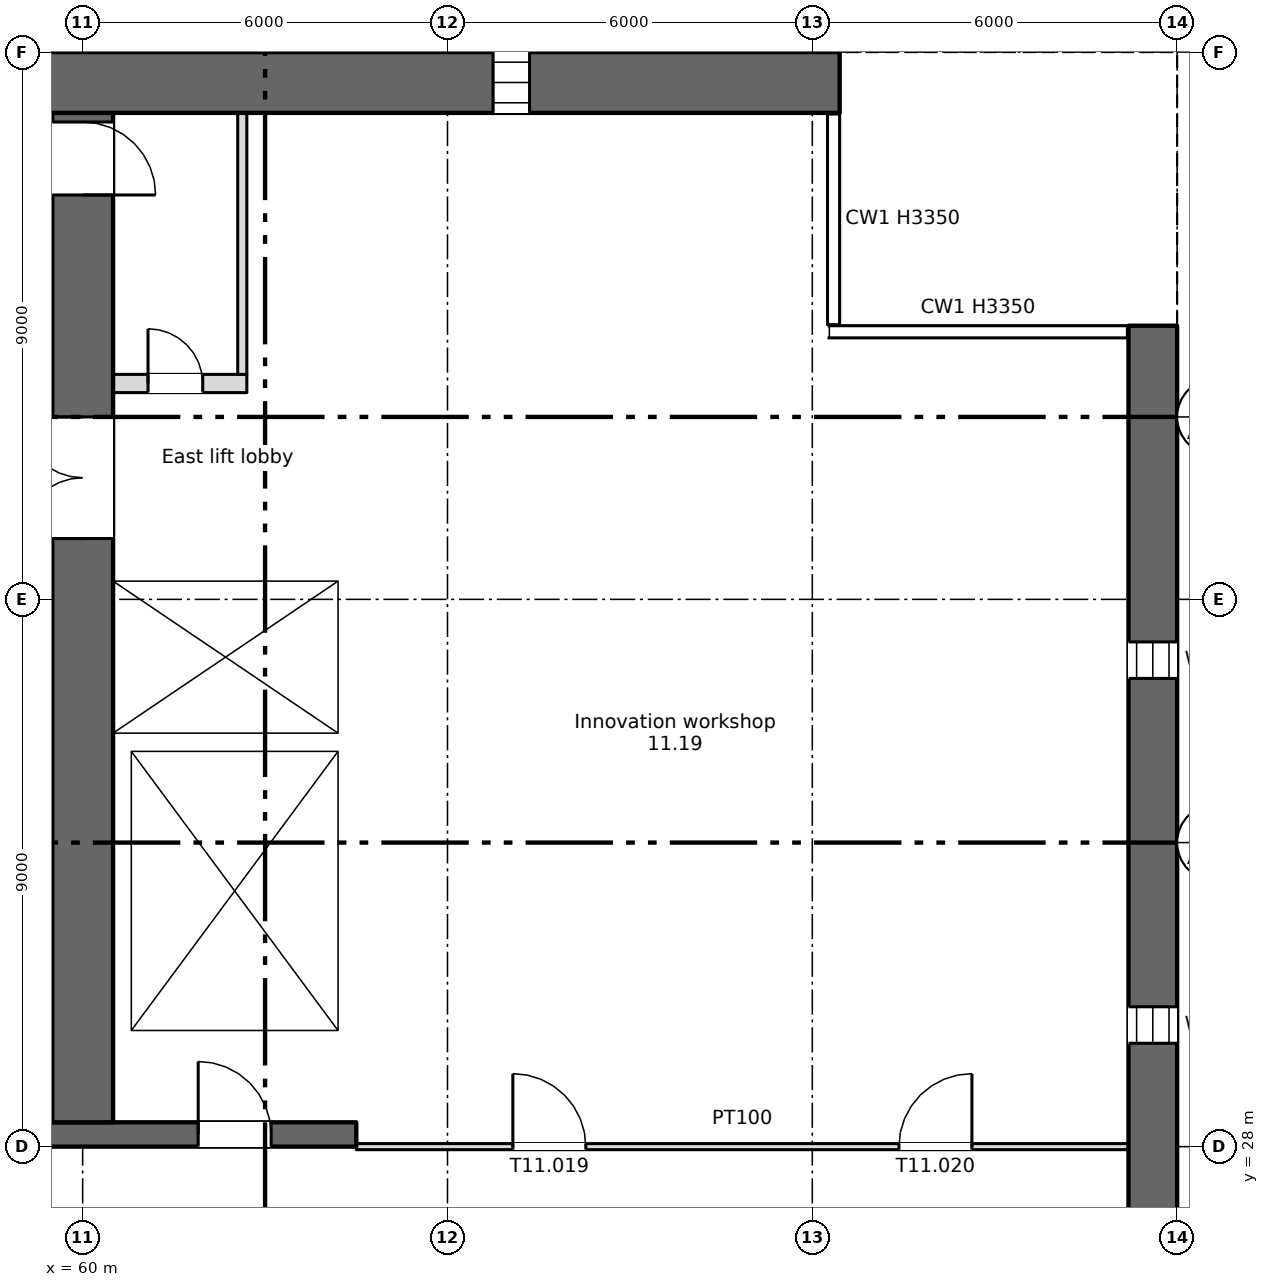
"""IFC4 building model, lengths in metres.
Left out: names, types, materials, properties, quantities, classifications, styles, units other than length and angle.
Written with IfcOpenShell. Run it as: python <this file> out.ifc"""

import sys

from ifc_helpers import new_model, si_unit, direction, frame, frame_2d, origin, place, context, subcontext, project, spatial, rectangle, extrude, element, fill, save


model = new_model("IFC4")
c1 = context("Model", 3, precision=1e-05, world=origin(), true_north=direction((0.0, 1.0)))
c2 = subcontext(c1, "Body", "Model", "MODEL_VIEW")
j1 = project(units=[si_unit("LENGTHUNIT", "METRE"), si_unit("PLANEANGLEUNIT", "RADIAN")], contexts=[c1])
p1 = place(None, origin())
s1 = spatial("IfcSite", under=j1, at=p1, CompositionType="ELEMENT")
p2 = place(p1, origin())
s2 = spatial("IfcBuilding", under=s1, at=p2, CompositionType="ELEMENT")
p3 = place(p2, frame((0.0, 0.0, 52.5)))
s3 = spatial("IfcBuildingStorey", under=s2, at=p3, CompositionType="ELEMENT", Elevation=52.5)
p4 = place(p3, frame((77.6, 4.5, 0.0), z_axis=(0.0, 0.0, 1.0), x_axis=(0.0, 1.0, 0.0)))
e1 = element("IfcWall", 1, at=p4, inside=s3, PredefinedType="SHEAR", context=c2, shape_type="SweptSolid", body=[
    extrude(rectangle(XDim=37.0, YDim=0.8, at=frame_2d((18.5, 0.0))), origin(), (0.0, 0.0, 1.0), 3.35),
])
p5 = place(p4, frame((1.2, 0.0, 0.6)))
e2 = element("IfcOpeningElement", 2, at=p5, cuts=e1, PredefinedType="OPENING", context=c2, shape_type="SweptSolid", body=[
    extrude(rectangle(XDim=0.6, YDim=2.4, at=frame_2d((0.3, 1.2))), frame((0.0, 0.41, 0.0), z_axis=(0.0, -1.0, 0.0), x_axis=(1.0, 0.0, 0.0)), (0.0, 0.0, 1.0), 0.82),
])
p6 = place(p4, frame((7.2, 0.0, 0.6)))
e3 = element("IfcOpeningElement", 3, at=p6, cuts=e1, PredefinedType="OPENING", context=c2, shape_type="SweptSolid", body=[
    extrude(rectangle(XDim=0.6, YDim=2.4, at=frame_2d((0.3, 1.2))), frame((0.0, 0.41, 0.0), z_axis=(0.0, -1.0, 0.0), x_axis=(1.0, 0.0, 0.0)), (0.0, 0.0, 1.0), 0.82),
])
p7 = place(p4, frame((13.2, 0.0, 0.6)))
e4 = element("IfcOpeningElement", 4, at=p7, cuts=e1, PredefinedType="OPENING", context=c2, shape_type="SweptSolid", body=[
    extrude(rectangle(XDim=0.6, YDim=2.4, at=frame_2d((0.3, 1.2))), frame((0.0, 0.41, 0.0), z_axis=(0.0, -1.0, 0.0), x_axis=(1.0, 0.0, 0.0)), (0.0, 0.0, 1.0), 0.82),
])
p8 = place(p4, frame((19.2, 0.0, 0.6)))
e5 = element("IfcOpeningElement", 5, at=p8, cuts=e1, PredefinedType="OPENING", context=c2, shape_type="SweptSolid", body=[
    extrude(rectangle(XDim=0.6, YDim=2.4, at=frame_2d((0.3, 1.2))), frame((0.0, 0.41, 0.0), z_axis=(0.0, -1.0, 0.0), x_axis=(1.0, 0.0, 0.0)), (0.0, 0.0, 1.0), 0.82),
])
p9 = place(p4, frame((25.2, 0.0, 0.6)))
e6 = element("IfcOpeningElement", 6, at=p9, cuts=e1, PredefinedType="OPENING", context=c2, shape_type="SweptSolid", body=[
    extrude(rectangle(XDim=0.6, YDim=2.4, at=frame_2d((0.3, 1.2))), frame((0.0, 0.41, 0.0), z_axis=(0.0, -1.0, 0.0), x_axis=(1.0, 0.0, 0.0)), (0.0, 0.0, 1.0), 0.82),
])
p10 = place(p4, frame((31.2, 0.0, 0.6)))
e7 = element("IfcOpeningElement", 7, at=p10, cuts=e1, PredefinedType="OPENING", context=c2, shape_type="SweptSolid", body=[
    extrude(rectangle(XDim=0.6, YDim=2.4, at=frame_2d((0.3, 1.2))), frame((0.0, 0.41, 0.0), z_axis=(0.0, -1.0, 0.0), x_axis=(1.0, 0.0, 0.0)), (0.0, 0.0, 1.0), 0.82),
])
p11 = place(p3, frame((5.55, 45.5, 0.0), z_axis=(0.0, 0.0, 1.0), x_axis=(1.0, 0.0, 0.0)))
e8 = element("IfcWall", 8, at=p11, inside=s3, PredefinedType="SHEAR", context=c2, shape_type="SweptSolid", body=[
    extrude(rectangle(XDim=66.9, YDim=1.0, at=frame_2d((33.45, 0.0))), origin(), (0.0, 0.0, 1.0), 3.35),
])
p12 = place(p11, frame((1.2, 0.0, 0.6)))
e9 = element("IfcOpeningElement", 9, at=p12, cuts=e8, PredefinedType="OPENING", context=c2, shape_type="SweptSolid", body=[
    extrude(rectangle(XDim=0.6, YDim=2.4, at=frame_2d((0.3, 1.2))), frame((0.0, 0.51, 0.0), z_axis=(0.0, -1.0, 0.0), x_axis=(1.0, 0.0, 0.0)), (0.0, 0.0, 1.0), 1.02),
])
p13 = place(p11, frame((7.2, 0.0, 0.6)))
e10 = element("IfcOpeningElement", 10, at=p13, cuts=e8, PredefinedType="OPENING", context=c2, shape_type="SweptSolid", body=[
    extrude(rectangle(XDim=0.6, YDim=2.4, at=frame_2d((0.3, 1.2))), frame((0.0, 0.51, 0.0), z_axis=(0.0, -1.0, 0.0), x_axis=(1.0, 0.0, 0.0)), (0.0, 0.0, 1.0), 1.02),
])
p14 = place(p11, frame((61.2, 0.0, 0.6)))
e11 = element("IfcOpeningElement", 11, at=p14, cuts=e8, PredefinedType="OPENING", context=c2, shape_type="SweptSolid", body=[
    extrude(rectangle(XDim=0.6, YDim=2.4, at=frame_2d((0.3, 1.2))), frame((0.0, 0.51, 0.0), z_axis=(0.0, -1.0, 0.0), x_axis=(1.0, 0.0, 0.0)), (0.0, 0.0, 1.0), 1.02),
])
p15 = place(p3, frame((6.7, 28.2, 0.0), z_axis=(0.0, 0.0, 1.0), x_axis=(1.0, 0.0, 0.0)))
e12 = element("IfcWall", 12, at=p15, inside=s3, PredefinedType="SHEAR", context=c2, shape_type="SweptSolid", body=[
    extrude(rectangle(XDim=57.8, YDim=0.4, at=frame_2d((28.9, 0.0))), origin(), (0.0, 0.0, 1.0), 3.35),
])
p16 = place(p15, frame((13.85, 0.0, 0.0)))
e13 = element("IfcOpeningElement", 13, at=p16, cuts=e12, PredefinedType="OPENING", context=c2, shape_type="SweptSolid", body=[
    extrude(rectangle(XDim=0.9, YDim=2.1, at=frame_2d((0.45, 1.05))), frame((0.0, 0.21, 0.0), z_axis=(0.0, -1.0, 0.0), x_axis=(1.0, 0.0, 0.0)), (0.0, 0.0, 1.0), 0.42),
])
p17 = place(p15, frame((48.562, 0.0, 0.0)))
e14 = element("IfcOpeningElement", 14, at=p17, cuts=e12, PredefinedType="OPENING", context=c2, shape_type="SweptSolid", body=[
    extrude(rectangle(XDim=0.9, YDim=2.1, at=frame_2d((0.45, 1.05))), frame((0.0, 0.21, 0.0), z_axis=(0.0, -1.0, 0.0), x_axis=(1.0, 0.0, 0.0)), (0.0, 0.0, 1.0), 0.42),
])
p18 = place(p15, frame((51.137, 0.0, 0.0)))
e15 = element("IfcOpeningElement", 15, at=p18, cuts=e12, PredefinedType="OPENING", context=c2, shape_type="SweptSolid", body=[
    extrude(rectangle(XDim=0.9, YDim=2.1, at=frame_2d((0.45, 1.05))), frame((0.0, 0.21, 0.0), z_axis=(0.0, -1.0, 0.0), x_axis=(1.0, 0.0, 0.0)), (0.0, 0.0, 1.0), 0.42),
])
p19 = place(p15, frame((1.35, 0.0, 0.0)))
e16 = element("IfcOpeningElement", 16, at=p19, cuts=e12, PredefinedType="OPENING", context=c2, shape_type="SweptSolid", body=[
    extrude(rectangle(XDim=0.9, YDim=2.1, at=frame_2d((0.45, 1.05))), frame((0.0, 0.21, 0.0), z_axis=(0.0, -1.0, 0.0), x_axis=(1.0, 0.0, 0.0)), (0.0, 0.0, 1.0), 0.42),
])
p20 = place(p15, frame((4.7, 0.0, 0.0)))
e17 = element("IfcOpeningElement", 17, at=p20, cuts=e12, PredefinedType="OPENING", context=c2, shape_type="SweptSolid", body=[
    extrude(rectangle(XDim=1.2, YDim=2.1, at=frame_2d((0.6, 1.05))), frame((0.0, 0.21, 0.0), z_axis=(0.0, -1.0, 0.0), x_axis=(1.0, 0.0, 0.0)), (0.0, 0.0, 1.0), 0.42),
])
p21 = place(p15, frame((31.7, 0.0, 0.0)))
e18 = element("IfcOpeningElement", 18, at=p21, cuts=e12, PredefinedType="OPENING", context=c2, shape_type="SweptSolid", body=[
    extrude(rectangle(XDim=1.2, YDim=2.1, at=frame_2d((0.6, 1.05))), frame((0.0, 0.21, 0.0), z_axis=(0.0, -1.0, 0.0), x_axis=(1.0, 0.0, 0.0)), (0.0, 0.0, 1.0), 0.42),
])
p22 = place(p15, frame((55.2, 0.0, 0.0)))
e19 = element("IfcOpeningElement", 19, at=p22, cuts=e12, PredefinedType="OPENING", context=c2, shape_type="SweptSolid", body=[
    extrude(rectangle(XDim=1.2, YDim=2.1, at=frame_2d((0.6, 1.05))), frame((0.0, 0.21, 0.0), z_axis=(0.0, -1.0, 0.0), x_axis=(1.0, 0.0, 0.0)), (0.0, 0.0, 1.0), 0.42),
])
p23 = place(p15, frame((21.7, 0.0, 0.0)))
e20 = element("IfcOpeningElement", 20, at=p23, cuts=e12, PredefinedType="OPENING", context=c2, shape_type="SweptSolid", body=[
    extrude(rectangle(XDim=1.2, YDim=2.1, at=frame_2d((0.6, 1.05))), frame((0.0, 0.21, 0.0), z_axis=(0.0, -1.0, 0.0), x_axis=(1.0, 0.0, 0.0)), (0.0, 0.0, 1.0), 0.42),
])
p24 = place(p15, frame((41.7, 0.0, 0.0)))
e21 = element("IfcOpeningElement", 21, at=p24, cuts=e12, PredefinedType="OPENING", context=c2, shape_type="SweptSolid", body=[
    extrude(rectangle(XDim=1.2, YDim=2.1, at=frame_2d((0.6, 1.05))), frame((0.0, 0.21, 0.0), z_axis=(0.0, -1.0, 0.0), x_axis=(1.0, 0.0, 0.0)), (0.0, 0.0, 1.0), 0.42),
])
p25 = place(p15, frame((24.85, 0.0, 0.0)))
e22 = element("IfcOpeningElement", 22, at=p25, cuts=e12, PredefinedType="OPENING", context=c2, shape_type="SweptSolid", body=[
    extrude(rectangle(XDim=2.4, YDim=2.1, at=frame_2d((1.2, 1.05))), frame((0.0, 0.21, 0.0), z_axis=(0.0, -1.0, 0.0), x_axis=(1.0, 0.0, 0.0)), (0.0, 0.0, 1.0), 0.42),
])
p26 = place(p15, frame((37.35, 0.0, 0.0)))
e23 = element("IfcOpeningElement", 23, at=p26, cuts=e12, PredefinedType="OPENING", context=c2, shape_type="SweptSolid", body=[
    extrude(rectangle(XDim=2.4, YDim=2.1, at=frame_2d((1.2, 1.05))), frame((0.0, 0.21, 0.0), z_axis=(0.0, -1.0, 0.0), x_axis=(1.0, 0.0, 0.0)), (0.0, 0.0, 1.0), 0.42),
])
p27 = place(p15, frame((7.85, 0.0, 0.0)))
e24 = element("IfcOpeningElement", 24, at=p27, cuts=e12, PredefinedType="OPENING", context=c2, shape_type="SweptSolid", body=[
    extrude(rectangle(XDim=2.4, YDim=2.1, at=frame_2d((1.2, 1.05))), frame((0.0, 0.21, 0.0), z_axis=(0.0, -1.0, 0.0), x_axis=(1.0, 0.0, 0.0)), (0.0, 0.0, 1.0), 0.42),
])
p28 = place(p15, frame((28.85, 0.0, 0.0)))
e25 = element("IfcOpeningElement", 25, at=p28, cuts=e12, PredefinedType="OPENING", context=c2, shape_type="SweptSolid", body=[
    extrude(rectangle(XDim=0.9, YDim=2.1, at=frame_2d((0.45, 1.05))), frame((0.0, 0.21, 0.0), z_axis=(0.0, -1.0, 0.0), x_axis=(1.0, 0.0, 0.0)), (0.0, 0.0, 1.0), 0.42),
])
p29 = place(p15, frame((34.85, 0.0, 0.0)))
e26 = element("IfcOpeningElement", 26, at=p29, cuts=e12, PredefinedType="OPENING", context=c2, shape_type="SweptSolid", body=[
    extrude(rectangle(XDim=0.9, YDim=2.1, at=frame_2d((0.45, 1.05))), frame((0.0, 0.21, 0.0), z_axis=(0.0, -1.0, 0.0), x_axis=(1.0, 0.0, 0.0)), (0.0, 0.0, 1.0), 0.42),
])
p30 = place(p3, frame((64.35, 34.8, 0.0), z_axis=(0.0, 0.0, 1.0), x_axis=(0.0, 1.0, 0.0)))
e27 = element("IfcWall", 27, at=p30, inside=s3, PredefinedType="SHEAR", context=c2, shape_type="SweptSolid", body=[
    extrude(rectangle(XDim=10.2, YDim=0.3, at=frame_2d((5.1, 0.0))), origin(), (0.0, 0.0, 1.0), 3.35),
])
p31 = place(p3, frame((60.0, 28.4, 0.0), z_axis=(0.0, 0.0, 1.0), x_axis=(0.0, 1.0, 0.0)))
e28 = element("IfcWall", 28, at=p31, inside=s3, PredefinedType="SHEAR", context=c2, shape_type="SweptSolid", body=[
    extrude(rectangle(XDim=16.6, YDim=1.0, at=frame_2d((8.3, 0.0))), origin(), (0.0, 0.0, 1.0), 3.35),
])
p32 = place(p31, frame((9.6, 0.0, 0.0)))
e29 = element("IfcOpeningElement", 29, at=p32, cuts=e28, PredefinedType="OPENING", context=c2, shape_type="SweptSolid", body=[
    extrude(rectangle(XDim=2.0, YDim=2.1, at=frame_2d((1.0, 1.05))), frame((0.0, 0.51, 0.0), z_axis=(0.0, -1.0, 0.0), x_axis=(1.0, 0.0, 0.0)), (0.0, 0.0, 1.0), 1.02),
])
p33 = place(p31, frame((15.25, 0.0, 0.0)))
e30 = element("IfcOpeningElement", 30, at=p33, cuts=e28, PredefinedType="OPENING", context=c2, shape_type="SweptSolid", body=[
    extrude(rectangle(XDim=1.2, YDim=2.1, at=frame_2d((0.6, 1.05))), frame((0.0, 0.51, 0.0), z_axis=(0.0, -1.0, 0.0), x_axis=(1.0, 0.0, 0.0)), (0.0, 0.0, 1.0), 1.02),
])
for number, where, z_axis, x_axis in (
    (31, (60.65, 28.4, 0.0), (0.0, 0.0, 1.0), (0.0, 1.0, 0.0)),
    (32, (64.35, 28.4, 0.0), (0.0, 0.0, 1.0), (0.0, 1.0, 0.0)),
):
    element("IfcWall", number, at=place(p3, frame(where, z_axis=z_axis, x_axis=x_axis)), inside=s3, PredefinedType="SHEAR", context=c2, shape_type="SweptSolid", body=[
        extrude(rectangle(XDim=6.1, YDim=0.3, at=frame_2d((3.05, 0.0))), origin(), (0.0, 0.0, 1.0), 3.35),
    ])
p34 = place(p3, frame((47.3, 34.65, 0.0), z_axis=(0.0, 0.0, 1.0), x_axis=(1.0, 0.0, 0.0)))
e33 = element("IfcWall", 33, at=p34, inside=s3, PredefinedType="SHEAR", context=c2, shape_type="SweptSolid", body=[
    extrude(rectangle(XDim=12.2, YDim=0.3, at=frame_2d((6.1, 0.0))), origin(), (0.0, 0.0, 1.0), 3.35),
])
p35 = place(p34, frame((1.3, 0.0, 0.0)))
e34 = element("IfcOpeningElement", 34, at=p35, cuts=e33, PredefinedType="OPENING", context=c2, shape_type="SweptSolid", body=[
    extrude(rectangle(XDim=1.1, YDim=2.1, at=frame_2d((0.55, 1.05))), frame((0.0, 0.16, 0.0), z_axis=(0.0, -1.0, 0.0), x_axis=(1.0, 0.0, 0.0)), (0.0, 0.0, 1.0), 0.32),
])
p36 = place(p3, frame((60.5, 34.65, 0.0), z_axis=(0.0, 0.0, 1.0), x_axis=(1.0, 0.0, 0.0)))
e35 = element("IfcWall", 35, at=p36, inside=s3, PredefinedType="SHEAR", context=c2, shape_type="SweptSolid", body=[
    extrude(rectangle(XDim=4.0, YDim=0.3, at=frame_2d((2.0, 0.0))), origin(), (0.0, 0.0, 1.0), 3.35),
])
p37 = place(p3, frame((60.5, 37.45, 0.0), z_axis=(0.0, 0.0, 1.0), x_axis=(1.0, 0.0, 0.0)))
e36 = element("IfcWall", 36, at=p37, inside=s3, PredefinedType="SHEAR", context=c2, shape_type="SweptSolid", body=[
    extrude(rectangle(XDim=3.7, YDim=0.3, at=frame_2d((1.85, 0.0))), origin(), (0.0, 0.0, 1.0), 3.35),
])
p38 = place(p37, frame((1.3, 0.0, 0.0)))
e37 = element("IfcOpeningElement", 37, at=p38, cuts=e36, PredefinedType="OPENING", context=c2, shape_type="SweptSolid", body=[
    extrude(rectangle(XDim=1.1, YDim=2.1, at=frame_2d((0.55, 1.05))), frame((0.0, 0.16, 0.0), z_axis=(0.0, -1.0, 0.0), x_axis=(1.0, 0.0, 0.0)), (0.0, 0.0, 1.0), 0.32),
])
p39 = place(p3, frame((60.5, 40.55, 0.0), z_axis=(0.0, 0.0, 1.0), x_axis=(1.0, 0.0, 0.0)))
e38 = element("IfcWall", 38, at=p39, inside=s3, PredefinedType="PARTITIONING", context=c2, shape_type="SweptSolid", body=[
    extrude(rectangle(XDim=2.2, YDim=0.3, at=frame_2d((1.1, 0.0))), origin(), (0.0, 0.0, 1.0), 3.35),
])
p40 = place(p39, frame((0.575, 0.0, 0.0)))
e39 = element("IfcOpeningElement", 39, at=p40, cuts=e38, PredefinedType="OPENING", context=c2, shape_type="SweptSolid", body=[
    extrude(rectangle(XDim=0.9, YDim=2.1, at=frame_2d((0.45, 1.05))), frame((0.0, 0.16, 0.0), z_axis=(0.0, -1.0, 0.0), x_axis=(1.0, 0.0, 0.0)), (0.0, 0.0, 1.0), 0.32),
])
p41 = place(p3, frame((62.625, 40.7, 0.0), z_axis=(0.0, 0.0, 1.0), x_axis=(0.0, 1.0, 0.0)))
e40 = element("IfcWall", 40, at=p41, inside=s3, PredefinedType="PARTITIONING", context=c2, shape_type="SweptSolid", body=[
    extrude(rectangle(XDim=4.3, YDim=0.15, at=frame_2d((2.15, 0.0))), origin(), (0.0, 0.0, 1.0), 3.35),
])
p42 = place(p3, frame((64.5, 28.0, 0.0), z_axis=(0.0, 0.0, 1.0), x_axis=(1.0, 0.0, 0.0)))
e41 = element("IfcWall", 41, at=p42, inside=s3, PredefinedType="PARTITIONING", context=c2, shape_type="SweptSolid", body=[
    extrude(rectangle(XDim=12.7, YDim=0.1, at=frame_2d((6.35, 0.0))), origin(), (0.0, 0.0, 1.0), 3.35),
])
p43 = place(p42, frame((2.575, 0.0, 0.0)))
e42 = element("IfcOpeningElement", 42, at=p43, cuts=e41, PredefinedType="OPENING", context=c2, shape_type="SweptSolid", body=[
    extrude(rectangle(XDim=1.2, YDim=2.1, at=frame_2d((0.6, 1.05))), frame((0.0, 0.06, 0.0), z_axis=(0.0, -1.0, 0.0), x_axis=(1.0, 0.0, 0.0)), (0.0, 0.0, 1.0), 0.12),
])
p44 = place(p42, frame((8.925, 0.0, 0.0)))
e43 = element("IfcOpeningElement", 43, at=p44, cuts=e41, PredefinedType="OPENING", context=c2, shape_type="SweptSolid", body=[
    extrude(rectangle(XDim=1.2, YDim=2.1, at=frame_2d((0.6, 1.05))), frame((0.0, 0.06, 0.0), z_axis=(0.0, -1.0, 0.0), x_axis=(1.0, 0.0, 0.0)), (0.0, 0.0, 1.0), 0.12),
])
p45 = place(p14, origin())
e44 = element("IfcWindow", 44, at=p45, inside=s3, PartitioningType="SINGLE_PANEL", PredefinedType="WINDOW", context=c2, shape_type="SweptSolid", body=[
    extrude(rectangle(XDim=0.6, YDim=2.4, at=frame_2d((0.3, 1.2))), frame((0.0, 0.03, 0.0), z_axis=(0.0, -1.0, 0.0), x_axis=(1.0, 0.0, 0.0)), (0.0, 0.0, 1.0), 0.06),
])
fill(e11, e44)
p46 = place(p9, origin())
e45 = element("IfcWindow", 45, at=p46, inside=s3, PartitioningType="SINGLE_PANEL", PredefinedType="WINDOW", context=c2, shape_type="SweptSolid", body=[
    extrude(rectangle(XDim=0.6, YDim=2.4, at=frame_2d((0.3, 1.2))), frame((0.0, 0.03, 0.0), z_axis=(0.0, -1.0, 0.0), x_axis=(1.0, 0.0, 0.0)), (0.0, 0.0, 1.0), 0.06),
])
fill(e6, e45)
p47 = place(p10, origin())
e46 = element("IfcWindow", 46, at=p47, inside=s3, PartitioningType="SINGLE_PANEL", PredefinedType="WINDOW", context=c2, shape_type="SweptSolid", body=[
    extrude(rectangle(XDim=0.6, YDim=2.4, at=frame_2d((0.3, 1.2))), frame((0.0, 0.03, 0.0), z_axis=(0.0, -1.0, 0.0), x_axis=(1.0, 0.0, 0.0)), (0.0, 0.0, 1.0), 0.06),
])
fill(e7, e46)
p48 = place(p40, origin())
e47 = element("IfcDoor", 47, at=p48, inside=s3, OperationType="SINGLE_SWING_LEFT", PredefinedType="DOOR", context=c2, shape_type="SweptSolid", body=[
    extrude(rectangle(XDim=0.9, YDim=2.1, at=frame_2d((0.45, 1.05))), frame((0.0, 0.025, 0.0), z_axis=(0.0, -1.0, 0.0), x_axis=(1.0, 0.0, 0.0)), (0.0, 0.0, 1.0), 0.05),
])
fill(e39, e47)
p49 = place(p38, origin())
e48 = element("IfcDoor", 48, at=p49, inside=s3, OperationType="SLIDING_TO_LEFT", PredefinedType="DOOR", context=c2, shape_type="SweptSolid", body=[
    extrude(rectangle(XDim=1.1, YDim=2.1, at=frame_2d((0.55, 1.05))), frame((0.0, 0.025, 0.0), z_axis=(0.0, -1.0, 0.0), x_axis=(1.0, 0.0, 0.0)), (0.0, 0.0, 1.0), 0.05),
])
fill(e37, e48)
p50 = place(p22, origin())
e49 = element("IfcDoor", 49, at=p50, inside=s3, OperationType="SINGLE_SWING_LEFT", PredefinedType="DOOR", context=c2, shape_type="SweptSolid", body=[
    extrude(rectangle(XDim=1.2, YDim=2.1, at=frame_2d((0.6, 1.05))), frame((0.0, 0.025, 0.0), z_axis=(0.0, -1.0, 0.0), x_axis=(1.0, 0.0, 0.0)), (0.0, 0.0, 1.0), 0.05),
])
fill(e19, e49)
p51 = place(p32, origin())
e50 = element("IfcDoor", 50, at=p51, inside=s3, OperationType="DOUBLE_DOOR_SINGLE_SWING", PredefinedType="DOOR", context=c2, shape_type="SweptSolid", body=[
    extrude(rectangle(XDim=2.0, YDim=2.1, at=frame_2d((1.0, 1.05))), frame((0.0, 0.025, 0.0), z_axis=(0.0, -1.0, 0.0), x_axis=(1.0, 0.0, 0.0)), (0.0, 0.0, 1.0), 0.05),
])
fill(e29, e50)
p52 = place(p33, origin())
e51 = element("IfcDoor", 51, at=p52, inside=s3, OperationType="SINGLE_SWING_LEFT", PredefinedType="DOOR", context=c2, shape_type="SweptSolid", body=[
    extrude(rectangle(XDim=1.2, YDim=2.1, at=frame_2d((0.6, 1.05))), frame((0.0, 0.025, 0.0), z_axis=(0.0, -1.0, 0.0), x_axis=(1.0, 0.0, 0.0)), (0.0, 0.0, 1.0), 0.05),
])
fill(e30, e51)
p53 = place(p43, origin())
e52 = element("IfcDoor", 52, at=p53, inside=s3, OperationType="SINGLE_SWING_LEFT", PredefinedType="DOOR", context=c2, shape_type="SweptSolid", body=[
    extrude(rectangle(XDim=1.2, YDim=2.1, at=frame_2d((0.6, 1.05))), frame((0.0, 0.025, 0.0), z_axis=(0.0, -1.0, 0.0), x_axis=(1.0, 0.0, 0.0)), (0.0, 0.0, 1.0), 0.05),
])
fill(e42, e52)
p54 = place(p44, origin())
e53 = element("IfcDoor", 53, at=p54, inside=s3, OperationType="SINGLE_SWING_RIGHT", PredefinedType="DOOR", context=c2, shape_type="SweptSolid", body=[
    extrude(rectangle(XDim=1.2, YDim=2.1, at=frame_2d((0.6, 1.05))), frame((0.0, 0.025, 0.0), z_axis=(0.0, -1.0, 0.0), x_axis=(1.0, 0.0, 0.0)), (0.0, 0.0, 1.0), 0.05),
])
fill(e43, e53)
save(model, sys.argv[1])
